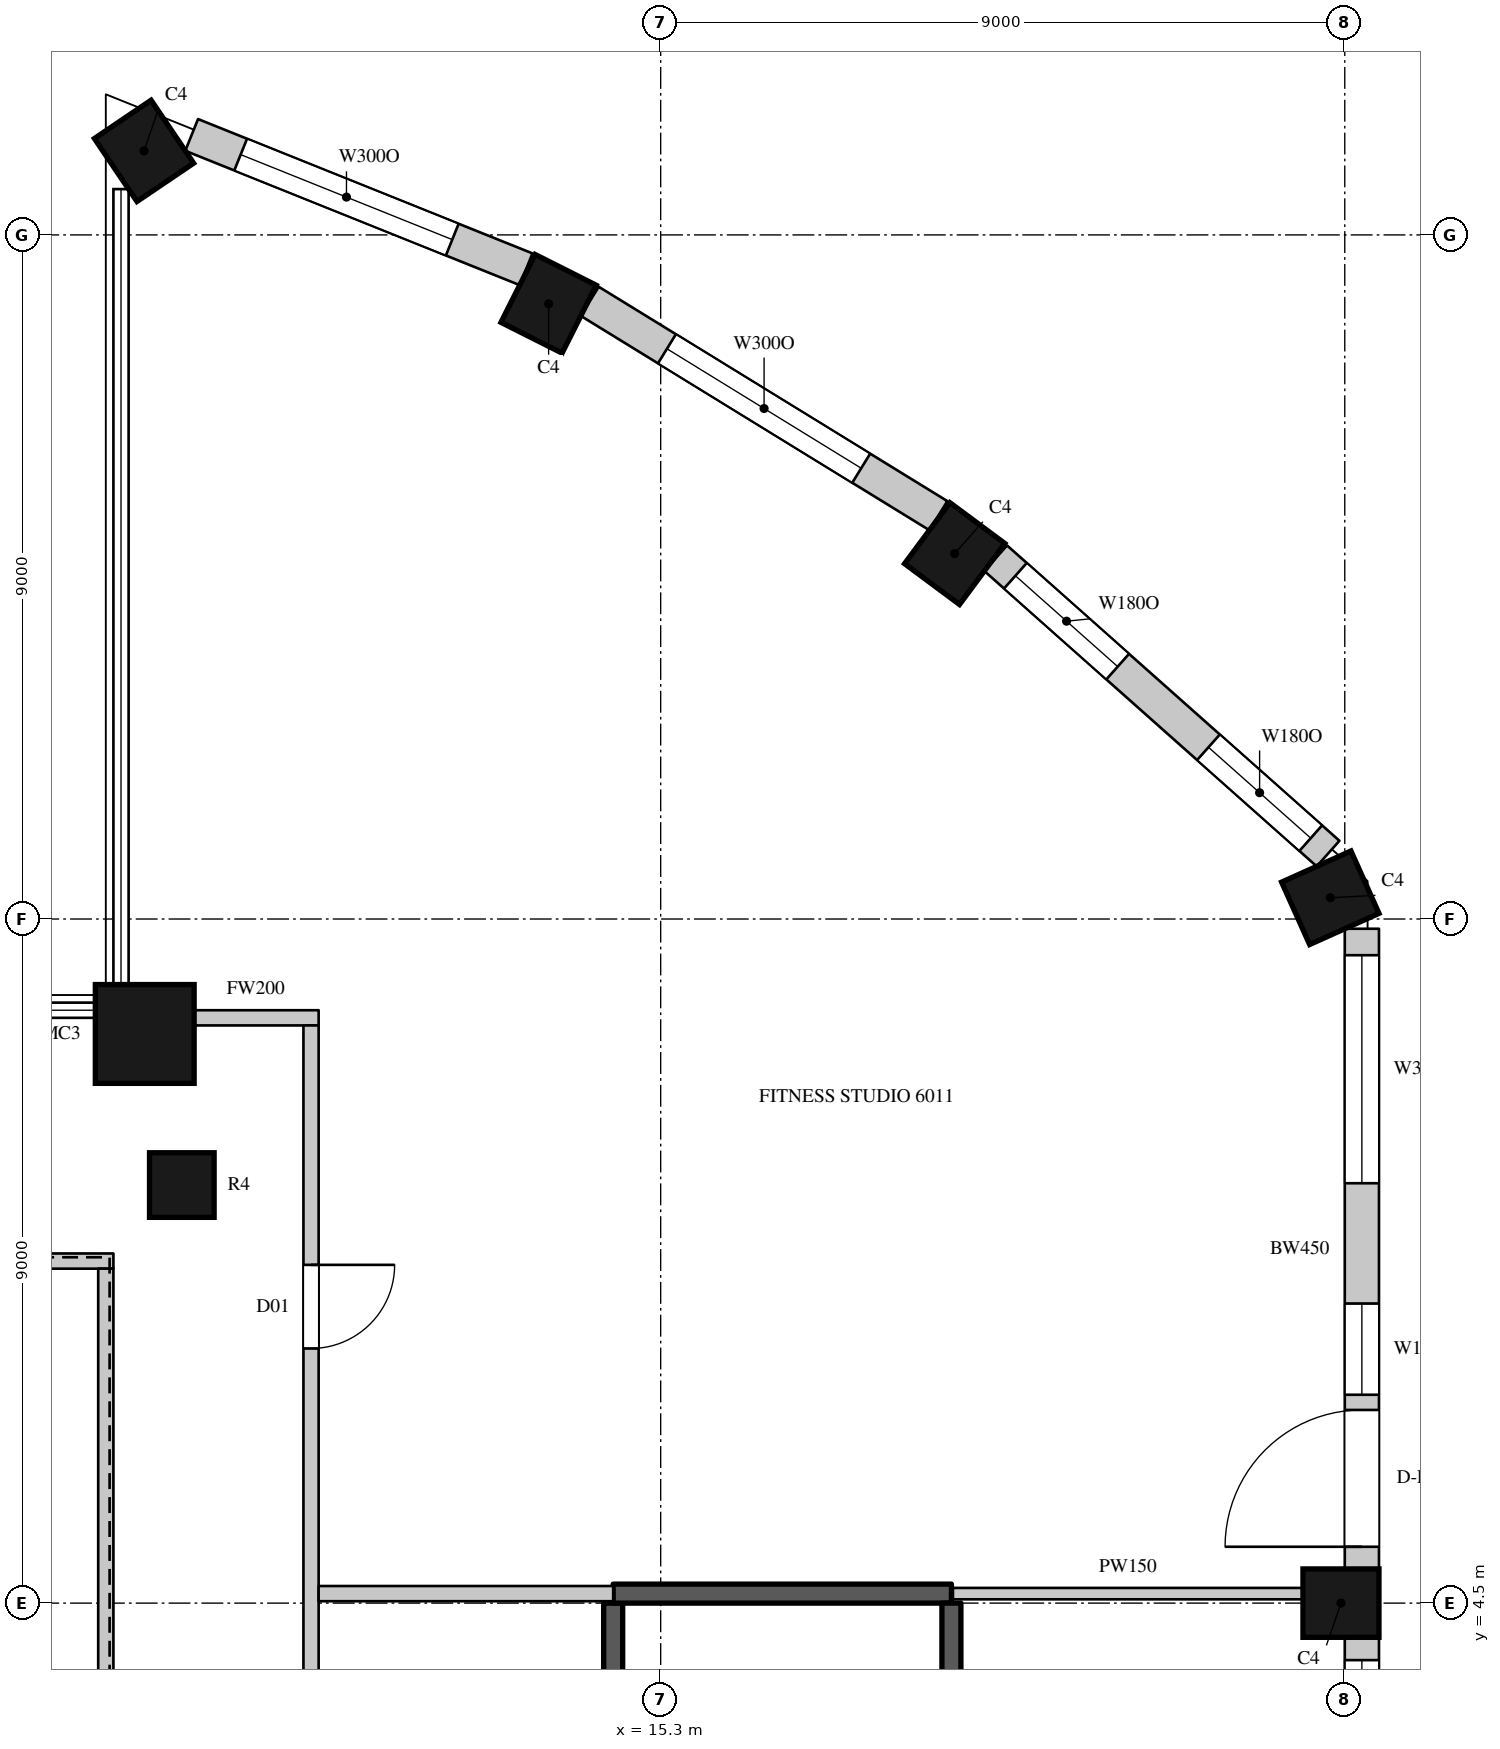
"""IFC4 building model, lengths in metres.
Left out: names, types, materials, properties, quantities, classifications, styles, units other than length and angle.
Written with IfcOpenShell. Run it as: python <this file> out.ifc"""

import sys

from ifc_helpers import new_model, si_unit, direction, frame, frame_2d, origin, origin_2d, place, context, subcontext, project, spatial, rectangle, circle, extrude, element, fill, save


model = new_model("IFC4")
c1 = context("Model", 3, precision=1e-05, world=origin(), true_north=direction((0.0, 1.0)))
c2 = subcontext(c1, "Body", "Model", "MODEL_VIEW")
j1 = project(units=[si_unit("LENGTHUNIT", "METRE"), si_unit("PLANEANGLEUNIT", "RADIAN")], contexts=[c1])
p1 = place(None, origin())
s1 = spatial("IfcSite", under=j1, at=p1, CompositionType="ELEMENT")
p2 = place(p1, origin())
s2 = spatial("IfcBuilding", under=s1, at=p2, CompositionType="ELEMENT")
p3 = place(p2, frame((0.0, 0.0, 268.0)))
s3 = spatial("IfcBuildingStorey", under=s2, at=p3, CompositionType="ELEMENT", Elevation=268.0)
p4 = place(p3, frame((8.503, 23.606, 0.0), z_axis=(0.0, 0.0, 1.0), x_axis=(-0.828469606019, -0.560034027451, 0.0)))
e1 = element("IfcColumn", 1, at=p4, inside=s3, PredefinedType="COLUMN", context=c2, shape_type="SweptSolid", body=[
    extrude(rectangle(XDim=0.9, YDim=1.0, at=origin_2d()), origin(), (0.0, 0.0, 1.0), 4.1),
])
p5 = place(p3, frame((8.512, 11.988, 0.0), z_axis=(0.0, 0.0, 1.0), x_axis=(1.0, 0.0, 0.0)))
e2 = element("IfcColumn", 2, at=p5, inside=s3, PredefinedType="COLUMN", context=c2, shape_type="SweptSolid", body=[
    extrude(circle(Radius=0.65, at=origin_2d()), origin(), (0.0, 0.0, 1.0), 4.1),
])
for number, where, z_axis, x_axis in (
    (3, (24.25, 4.5, 0.0), (0.0, 0.0, 1.0), (0.0, 1.0, 0.0)),
    (4, (24.11, 13.78, 0.0), (0.0, 0.0, 1.0), (-0.41, 0.912, 0.0)),
    (5, (19.168, 18.308, 0.0), (0.0, 0.0, 1.0), (-0.803, 0.596, 0.0)),
    (6, (13.826, 21.594, 0.0), (0.0, 0.0, 1.0), (-0.893, 0.45, 0.0)),
):
    element("IfcColumn", number, at=place(p3, frame(where, z_axis=z_axis, x_axis=x_axis)), inside=s3, PredefinedType="COLUMN", context=c2, shape_type="SweptSolid", body=[
        extrude(rectangle(XDim=0.9, YDim=1.0, at=origin_2d()), origin(), (0.0, 0.0, 1.0), 4.1),
    ])
p6 = place(p3, frame((9.0, 10.0, 0.0), z_axis=(0.0, 0.0, 1.0), x_axis=(1.0, 0.0, 0.0)))
e7 = element("IfcColumn", 7, at=p6, inside=s3, PredefinedType="COLUMN", context=c2, shape_type="SweptSolid", body=[
    extrude(circle(Radius=0.425, at=origin_2d()), origin(), (0.0, 0.0, 1.0), 4.1),
])
p7 = place(p3, frame((24.525, -4.05, 0.0), z_axis=(0.0, 0.0, 1.0), x_axis=(0.0, 1.0, 0.0)))
e8 = element("IfcWall", 8, at=p7, inside=s3, PredefinedType="SOLIDWALL", context=c2, shape_type="SweptSolid", body=[
    extrude(rectangle(XDim=8.1, YDim=0.45, at=frame_2d((4.05, 0.0))), origin(), (0.0, 0.0, 1.0), 3.8),
])
p8 = place(p7, frame((0.3, 0.0, 1.05)))
e9 = element("IfcOpeningElement", 9, at=p8, cuts=e8, PredefinedType="OPENING", context=c2, shape_type="SweptSolid", body=[
    extrude(rectangle(XDim=3.0, YDim=2.4, at=frame_2d((1.5, 1.2))), frame((0.0, 0.235, 0.0), z_axis=(0.0, -1.0, 0.0), x_axis=(1.0, 0.0, 0.0)), (0.0, 0.0, 1.0), 0.47),
])
p9 = place(p7, frame((4.8, 0.0, 1.05)))
e10 = element("IfcOpeningElement", 10, at=p9, cuts=e8, PredefinedType="OPENING", context=c2, shape_type="SweptSolid", body=[
    extrude(rectangle(XDim=3.0, YDim=2.4, at=frame_2d((1.5, 1.2))), frame((0.0, 0.235, 0.0), z_axis=(0.0, -1.0, 0.0), x_axis=(1.0, 0.0, 0.0)), (0.0, 0.0, 1.0), 0.47),
])
p10 = place(p3, frame((24.525, 4.95, 0.0), z_axis=(0.0, 0.0, 1.0), x_axis=(0.0, 1.0, 0.0)))
e11 = element("IfcWall", 11, at=p10, inside=s3, PredefinedType="SOLIDWALL", context=c2, shape_type="SweptSolid", body=[
    extrude(rectangle(XDim=8.422, YDim=0.45, at=frame_2d((4.211, 0.0))), origin(), (0.0, 0.0, 1.0), 3.8),
])
p11 = place(p10, frame((0.291, 0.0, 0.0)))
e12 = element("IfcOpeningElement", 12, at=p11, cuts=e11, PredefinedType="OPENING", context=c2, shape_type="SweptSolid", body=[
    extrude(rectangle(XDim=1.8, YDim=2.4, at=frame_2d((0.9, 1.2))), frame((0.0, 0.235, 0.0), z_axis=(0.0, -1.0, 0.0), x_axis=(1.0, 0.0, 0.0)), (0.0, 0.0, 1.0), 0.47),
])
p12 = place(p10, frame((2.291, 0.0, 1.05)))
e13 = element("IfcOpeningElement", 13, at=p12, cuts=e11, PredefinedType="OPENING", context=c2, shape_type="SweptSolid", body=[
    extrude(rectangle(XDim=1.2, YDim=2.4, at=frame_2d((0.6, 1.2))), frame((0.0, 0.235, 0.0), z_axis=(0.0, -1.0, 0.0), x_axis=(1.0, 0.0, 0.0)), (0.0, 0.0, 1.0), 0.47),
])
p13 = place(p10, frame((5.074, 0.0, 1.05)))
e14 = element("IfcOpeningElement", 14, at=p13, cuts=e11, PredefinedType="OPENING", context=c2, shape_type="SweptSolid", body=[
    extrude(rectangle(XDim=3.0, YDim=2.4, at=frame_2d((1.5, 1.2))), frame((0.0, 0.235, 0.0), z_axis=(0.0, -1.0, 0.0), x_axis=(1.0, 0.0, 0.0)), (0.0, 0.0, 1.0), 0.47),
])
p14 = place(p3, frame((24.081, 14.361, 0.0), z_axis=(0.0, 0.0, 1.0), x_axis=(-0.747570482973, 0.664182484704, 0.0)))
e15 = element("IfcWall", 15, at=p14, inside=s3, PredefinedType="SOLIDWALL", context=c2, shape_type="SweptSolid", body=[
    extrude(rectangle(XDim=5.85, YDim=0.45, at=frame_2d((2.925, 0.0))), origin(), (0.0, 0.0, 1.0), 3.8),
])
p15 = place(p14, frame((0.305, 0.0, 1.05)))
e16 = element("IfcOpeningElement", 16, at=p15, cuts=e15, PredefinedType="OPENING", context=c2, shape_type="SweptSolid", body=[
    extrude(rectangle(XDim=1.8, YDim=2.4, at=frame_2d((0.9, 1.2))), frame((0.0, 0.235, 0.0), z_axis=(0.0, -1.0, 0.0), x_axis=(1.0, 0.0, 0.0)), (0.0, 0.0, 1.0), 0.47),
])
p16 = place(p14, frame((3.703, 0.0, 1.05)))
e17 = element("IfcOpeningElement", 17, at=p16, cuts=e15, PredefinedType="OPENING", context=c2, shape_type="SweptSolid", body=[
    extrude(rectangle(XDim=1.8, YDim=2.4, at=frame_2d((0.9, 1.2))), frame((0.0, 0.235, 0.0), z_axis=(0.0, -1.0, 0.0), x_axis=(1.0, 0.0, 0.0)), (0.0, 0.0, 1.0), 0.47),
])
p17 = place(p3, frame((18.953, 18.806, 0.0), z_axis=(0.0, 0.0, 1.0), x_axis=(-0.851860664503, 0.523768468193, 0.0)))
e18 = element("IfcWall", 18, at=p17, inside=s3, PredefinedType="SOLIDWALL", context=c2, shape_type="SweptSolid", body=[
    extrude(rectangle(XDim=5.384, YDim=0.45, at=frame_2d((2.692, 0.0))), origin(), (0.0, 0.0, 1.0), 3.8),
])
p18 = place(p17, frame((1.192, 0.0, 1.05)))
e19 = element("IfcOpeningElement", 19, at=p18, cuts=e18, PredefinedType="OPENING", context=c2, shape_type="SweptSolid", body=[
    extrude(rectangle(XDim=3.0, YDim=2.4, at=frame_2d((1.5, 1.2))), frame((0.0, 0.235, 0.0), z_axis=(0.0, -1.0, 0.0), x_axis=(1.0, 0.0, 0.0)), (0.0, 0.0, 1.0), 0.47),
])
p19 = place(p3, frame((13.529, 22.048, 0.0), z_axis=(0.0, 0.0, 1.0), x_axis=(-0.927957332619, 0.372686448424, 0.0)))
e20 = element("IfcWall", 20, at=p19, inside=s3, PredefinedType="SOLIDWALL", context=c2, shape_type="SweptSolid", body=[
    extrude(rectangle(XDim=4.741, YDim=0.45, at=frame_2d((2.371, 0.0))), origin(), (0.0, 0.0, 1.0), 3.8),
])
p20 = place(p19, frame((1.047, 0.0, 1.05)))
e21 = element("IfcOpeningElement", 21, at=p20, cuts=e20, PredefinedType="OPENING", context=c2, shape_type="SweptSolid", body=[
    extrude(rectangle(XDim=3.0, YDim=2.4, at=frame_2d((1.5, 1.2))), frame((0.0, 0.235, 0.0), z_axis=(0.0, -1.0, 0.0), x_axis=(1.0, 0.0, 0.0)), (0.0, 0.0, 1.0), 0.47),
])
p21 = place(p3, frame((-6.1, 9.0, 0.0), z_axis=(0.0, 0.0, 1.0), x_axis=(1.0, 0.0, 0.0)))
e22 = element("IfcWall", 22, at=p21, inside=s3, PredefinedType="PARTITIONING", context=c2, shape_type="SweptSolid", body=[
    extrude(rectangle(XDim=14.2, YDim=0.2, at=frame_2d((7.1, 0.0))), origin(), (0.0, 0.0, 1.0), 3.8),
])
p22 = place(p3, frame((8.0, -4.48, 0.0), z_axis=(0.0, 0.0, 1.0), x_axis=(0.0, 1.0, 0.0)))
e23 = element("IfcWall", 23, at=p22, inside=s3, PredefinedType="PARTITIONING", context=c2, shape_type="SweptSolid", body=[
    extrude(rectangle(XDim=13.38, YDim=0.2, at=frame_2d((6.69, 0.0))), origin(), (0.0, 0.0, 1.0), 3.8),
])
p23 = place(p3, frame((9.144, 12.2, 0.0), z_axis=(0.0, 0.0, 1.0), x_axis=(1.0, 0.0, 0.0)))
e24 = element("IfcWall", 24, at=p23, inside=s3, PredefinedType="PARTITIONING", context=c2, shape_type="SweptSolid", body=[
    extrude(rectangle(XDim=1.656, YDim=0.2, at=frame_2d((0.828, 0.0))), origin(), (0.0, 0.0, 1.0), 3.8),
])
p24 = place(p3, frame((10.7, -11.7, 0.0), z_axis=(0.0, 0.0, 1.0), x_axis=(0.0, 1.0, 0.0)))
e25 = element("IfcWall", 25, at=p24, inside=s3, PredefinedType="PARTITIONING", context=c2, shape_type="SweptSolid", body=[
    extrude(rectangle(XDim=23.8, YDim=0.2, at=frame_2d((11.9, 0.0))), origin(), (0.0, 0.0, 1.0), 3.8),
])
p25 = place(p24, frame((12.35, 0.0, 0.0)))
e26 = element("IfcOpeningElement", 26, at=p25, cuts=e25, PredefinedType="OPENING", context=c2, shape_type="SweptSolid", body=[
    extrude(rectangle(XDim=1.5, YDim=2.4, at=frame_2d((0.75, 1.2))), frame((0.0, 0.11, 0.0), z_axis=(0.0, -1.0, 0.0), x_axis=(1.0, 0.0, 0.0)), (0.0, 0.0, 1.0), 0.22),
])
p26 = place(p24, frame((19.55, 0.0, 0.0)))
e27 = element("IfcOpeningElement", 27, at=p26, cuts=e25, PredefinedType="OPENING", context=c2, shape_type="SweptSolid", body=[
    extrude(rectangle(XDim=1.1, YDim=2.4, at=frame_2d((0.55, 1.2))), frame((0.0, 0.11, 0.0), z_axis=(0.0, -1.0, 0.0), x_axis=(1.0, 0.0, 0.0)), (0.0, 0.0, 1.0), 0.22),
])
p27 = place(p24, frame((4.25, 0.0, 0.0)))
e28 = element("IfcOpeningElement", 28, at=p27, cuts=e25, PredefinedType="OPENING", context=c2, shape_type="SweptSolid", body=[
    extrude(rectangle(XDim=1.1, YDim=2.4, at=frame_2d((0.55, 1.2))), frame((0.0, 0.11, 0.0), z_axis=(0.0, -1.0, 0.0), x_axis=(1.0, 0.0, 0.0)), (0.0, 0.0, 1.0), 0.22),
])
p28 = place(p3, frame((10.8, 4.625, 0.0), z_axis=(0.0, 0.0, 1.0), x_axis=(1.0, 0.0, 0.0)))
e29 = element("IfcWall", 29, at=p28, inside=s3, PredefinedType="PARTITIONING", context=c2, shape_type="SweptSolid", body=[
    extrude(rectangle(XDim=3.875, YDim=0.2, at=frame_2d((1.938, 0.0))), origin(), (0.0, 0.0, 1.0), 3.8),
])
p29 = place(p3, frame((19.145, 4.625, 0.0), z_axis=(0.0, 0.0, 1.0), x_axis=(1.0, 0.0, 0.0)))
e30 = element("IfcWall", 30, at=p29, inside=s3, PredefinedType="PARTITIONING", context=c2, shape_type="SweptSolid", body=[
    extrude(rectangle(XDim=4.605, YDim=0.15, at=frame_2d((2.302, 0.0))), origin(), (0.0, 0.0, 1.0), 3.8),
])
p30 = place(p3, frame((14.675, -4.5, 0.0), z_axis=(0.0, 0.0, 1.0), x_axis=(0.0, 1.0, 0.0)))
e31 = element("IfcWall", 31, at=p30, inside=s3, PredefinedType="SHEAR", context=c2, shape_type="SweptSolid", body=[
    extrude(rectangle(XDim=9.0, YDim=0.25, at=frame_2d((4.5, 0.0))), origin(), (0.0, 0.0, 1.0), 3.8),
])
p31 = place(p30, frame((0.45, 0.0, 0.0)))
e32 = element("IfcOpeningElement", 32, at=p31, cuts=e31, PredefinedType="OPENING", context=c2, shape_type="SweptSolid", body=[
    extrude(rectangle(XDim=1.1, YDim=2.2, at=frame_2d((0.55, 1.1))), frame((0.0, 0.135, 0.0), z_axis=(0.0, -1.0, 0.0), x_axis=(1.0, 0.0, 0.0)), (0.0, 0.0, 1.0), 0.27),
])
p32 = place(p3, frame((14.675, 4.625, 0.0), z_axis=(0.0, 0.0, 1.0), x_axis=(1.0, 0.0, 0.0)))
e33 = element("IfcWall", 33, at=p32, inside=s3, PredefinedType="SHEAR", context=c2, shape_type="SweptSolid", body=[
    extrude(rectangle(XDim=4.45, YDim=0.25, at=frame_2d((2.225, 0.0))), origin(), (0.0, 0.0, 1.0), 3.8),
])
p33 = place(p3, frame((19.125, -4.5, 0.0), z_axis=(0.0, 0.0, 1.0), x_axis=(0.0, 1.0, 0.0)))
e34 = element("IfcWall", 34, at=p33, inside=s3, PredefinedType="SHEAR", context=c2, shape_type="SweptSolid", body=[
    extrude(rectangle(XDim=9.0, YDim=0.25, at=frame_2d((4.5, 0.0))), origin(), (0.0, 0.0, 1.0), 3.8),
])
p34 = place(p9, origin())
e35 = element("IfcWindow", 35, at=p34, inside=s3, PartitioningType="SINGLE_PANEL", PredefinedType="WINDOW", context=c2, shape_type="SweptSolid", body=[
    extrude(rectangle(XDim=3.0, YDim=2.4, at=frame_2d((1.5, 1.2))), frame((0.0, 0.135, 0.0), z_axis=(0.0, -1.0, 0.0), x_axis=(1.0, 0.0, 0.0)), (0.0, 0.0, 1.0), 0.06),
])
fill(e10, e35)
p35 = place(p11, origin())
e36 = element("IfcDoor", 36, at=p35, inside=s3, OperationType="SLIDING_TO_LEFT", PredefinedType="DOOR", context=c2, shape_type="SweptSolid", body=[
    extrude(rectangle(XDim=1.8, YDim=2.4, at=frame_2d((0.9, 1.2))), frame((0.0, 0.13, 0.0), z_axis=(0.0, -1.0, 0.0), x_axis=(1.0, 0.0, 0.0)), (0.0, 0.0, 1.0), 0.05),
])
fill(e12, e36)
p36 = place(p12, origin())
e37 = element("IfcWindow", 37, at=p36, inside=s3, PartitioningType="SINGLE_PANEL", PredefinedType="WINDOW", context=c2, shape_type="SweptSolid", body=[
    extrude(rectangle(XDim=1.2, YDim=2.4, at=frame_2d((0.6, 1.2))), frame((0.0, 0.135, 0.0), z_axis=(0.0, -1.0, 0.0), x_axis=(1.0, 0.0, 0.0)), (0.0, 0.0, 1.0), 0.06),
])
fill(e13, e37)
p37 = place(p13, origin())
e38 = element("IfcWindow", 38, at=p37, inside=s3, PartitioningType="SINGLE_PANEL", PredefinedType="WINDOW", context=c2, shape_type="SweptSolid", body=[
    extrude(rectangle(XDim=3.0, YDim=2.4, at=frame_2d((1.5, 1.2))), frame((0.0, 0.135, 0.0), z_axis=(0.0, -1.0, 0.0), x_axis=(1.0, 0.0, 0.0)), (0.0, 0.0, 1.0), 0.06),
])
fill(e14, e38)
p38 = place(p15, origin())
e39 = element("IfcWindow", 39, at=p38, inside=s3, PartitioningType="SINGLE_PANEL", PredefinedType="WINDOW", context=c2, shape_type="SweptSolid", body=[
    extrude(rectangle(XDim=1.8, YDim=2.4, at=frame_2d((0.9, 1.2))), frame((0.0, 0.135, 0.0), z_axis=(0.0, -1.0, 0.0), x_axis=(1.0, 0.0, 0.0)), (0.0, 0.0, 1.0), 0.06),
])
fill(e16, e39)
p39 = place(p16, origin())
e40 = element("IfcWindow", 40, at=p39, inside=s3, PartitioningType="SINGLE_PANEL", PredefinedType="WINDOW", context=c2, shape_type="SweptSolid", body=[
    extrude(rectangle(XDim=1.8, YDim=2.4, at=frame_2d((0.9, 1.2))), frame((0.0, 0.135, 0.0), z_axis=(0.0, -1.0, 0.0), x_axis=(1.0, 0.0, 0.0)), (0.0, 0.0, 1.0), 0.06),
])
fill(e17, e40)
p40 = place(p18, origin())
e41 = element("IfcWindow", 41, at=p40, inside=s3, PartitioningType="SINGLE_PANEL", PredefinedType="WINDOW", context=c2, shape_type="SweptSolid", body=[
    extrude(rectangle(XDim=3.0, YDim=2.4, at=frame_2d((1.5, 1.2))), frame((0.0, 0.135, 0.0), z_axis=(0.0, -1.0, 0.0), x_axis=(1.0, 0.0, 0.0)), (0.0, 0.0, 1.0), 0.06),
])
fill(e19, e41)
p41 = place(p20, origin())
e42 = element("IfcWindow", 42, at=p41, inside=s3, PartitioningType="SINGLE_PANEL", PredefinedType="WINDOW", context=c2, shape_type="SweptSolid", body=[
    extrude(rectangle(XDim=3.0, YDim=2.4, at=frame_2d((1.5, 1.2))), frame((0.0, 0.135, 0.0), z_axis=(0.0, -1.0, 0.0), x_axis=(1.0, 0.0, 0.0)), (0.0, 0.0, 1.0), 0.06),
])
fill(e21, e42)
p42 = place(p26, origin())
e43 = element("IfcDoor", 43, at=p42, inside=s3, OperationType="SINGLE_SWING_LEFT", PredefinedType="DOOR", context=c2, shape_type="SweptSolid", body=[
    extrude(rectangle(XDim=1.1, YDim=2.4, at=frame_2d((0.55, 1.2))), frame((0.0, 0.025, 0.0), z_axis=(0.0, -1.0, 0.0), x_axis=(1.0, 0.0, 0.0)), (0.0, 0.0, 1.0), 0.05),
])
fill(e27, e43)
save(model, sys.argv[1])
